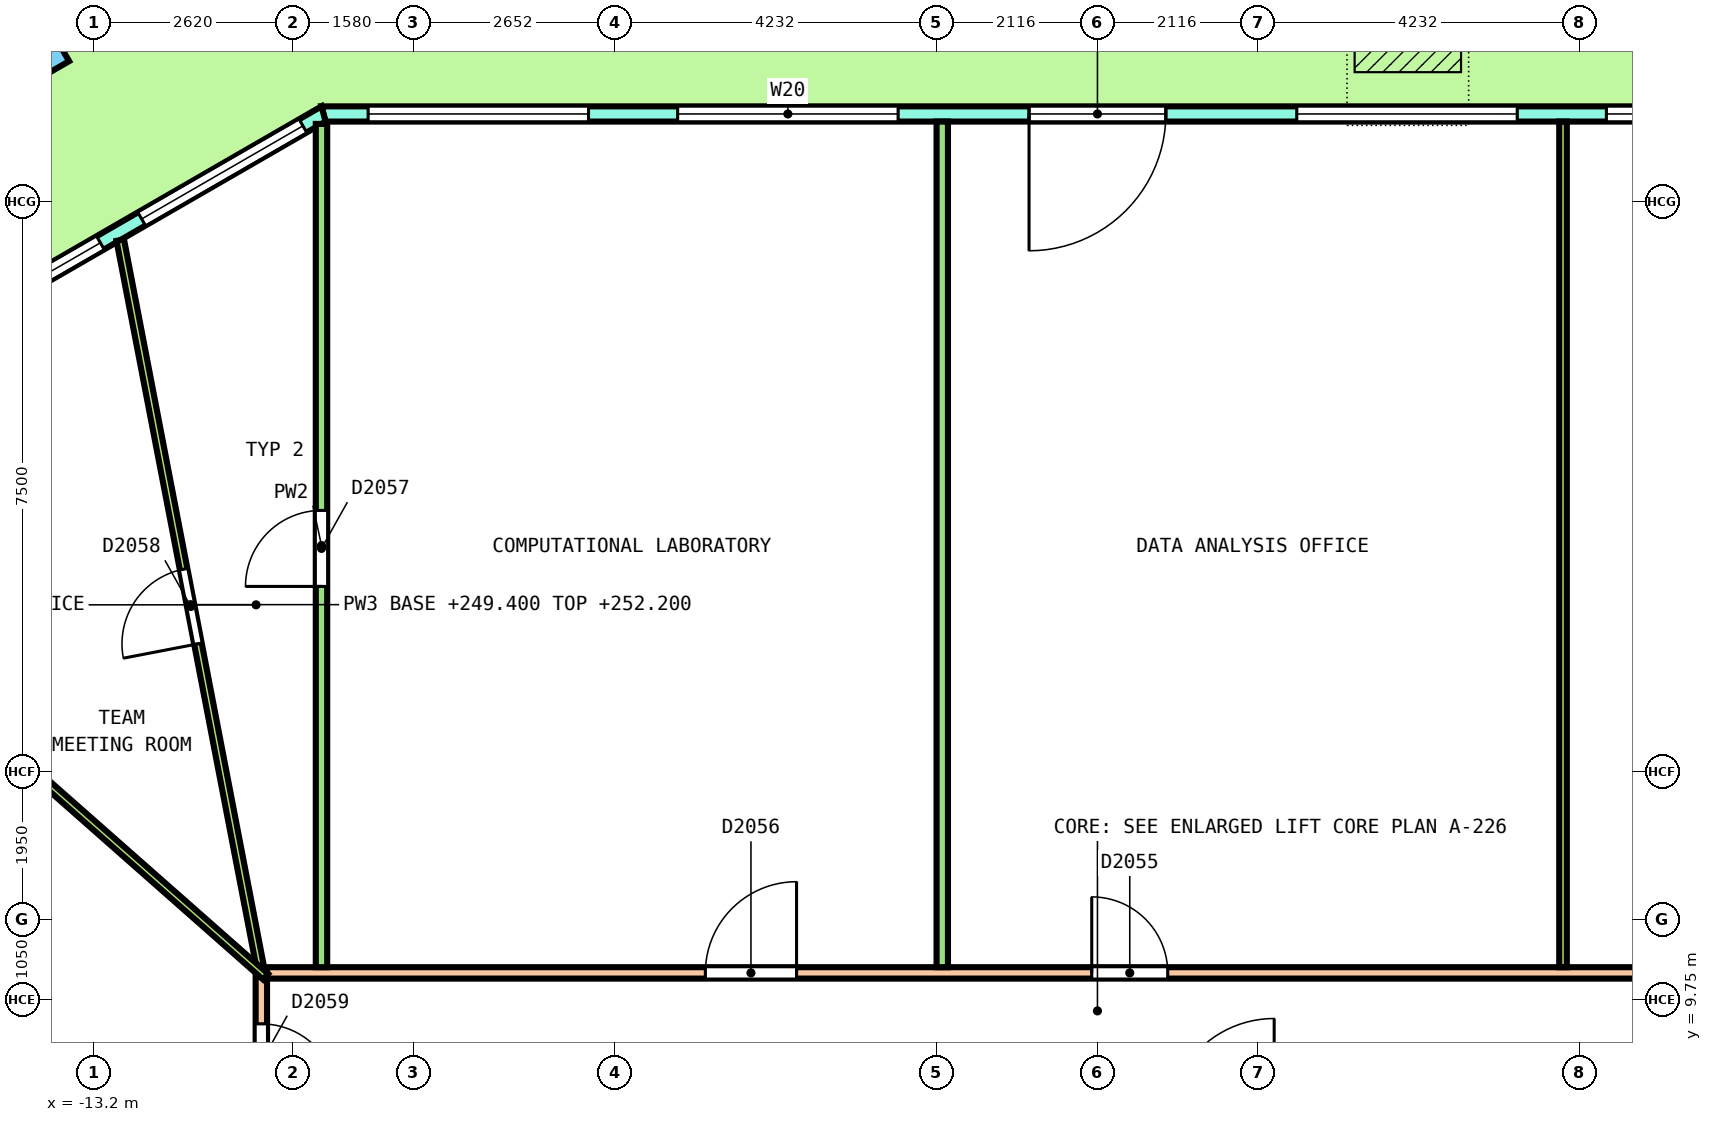
"""IFC4 building model, lengths in metres.
Left out: names, types, materials, properties, quantities, classifications, styles, units other than length and angle.
Written with IfcOpenShell. Run it as: python <this file> out.ifc"""

import sys

from ifc_helpers import new_model, si_unit, direction, frame, frame_2d, origin, origin_2d, place, context, subcontext, project, spatial, polyline, rectangle, outline, extrude, element, fill, save


model = new_model("IFC4")
c1 = context("Model", 3, precision=1e-05, world=origin(), true_north=direction((0.0, 1.0)))
c2 = subcontext(c1, "Body", "Model", "MODEL_VIEW")
j1 = project(units=[si_unit("LENGTHUNIT", "METRE"), si_unit("PLANEANGLEUNIT", "RADIAN")], contexts=[c1])
p1 = place(None, origin())
s1 = spatial("IfcSite", under=j1, at=p1, CompositionType="ELEMENT")
p2 = place(p1, origin())
s2 = spatial("IfcBuilding", under=s1, at=p2, CompositionType="ELEMENT")
p3 = place(p2, frame((0.0, 0.0, 249.4)))
s3 = spatial("IfcBuildingStorey", under=s2, at=p3, CompositionType="ELEMENT", Elevation=249.4)
p4 = place(p3, frame((-14.246, 22.287, 0.0), z_axis=(-0.036260511264, 0.0, 0.999342371424), x_axis=(-0.865313694921, -0.500246354177, -0.031397364786)))
e1 = element("IfcColumn", 1, at=p4, inside=s3, PredefinedType="COLUMN", context=c2, shape_type="SweptSolid", body=[
    extrude(rectangle(XDim=1.05, YDim=1.05, at=origin_2d()), origin(), (0.0, 0.0, 1.0), 3.643),
])
p5 = place(p3, frame((10.182, 21.4, 0.0), z_axis=(0.0, 0.0, 1.0), x_axis=(-1.0, 0.0, 0.0)))
e2 = element("IfcWall", 2, at=p5, inside=s3, PredefinedType="SOLIDWALL", context=c2, shape_type="SweptSolid", body=[
    extrude(outline(polyline([(-0.027, -0.1), (0.994, -0.1), (2.015, -0.1), (3.036, -0.1), (4.057, -0.1), (5.078, -0.1), (6.098, -0.1), (7.119, -0.1), (8.14, -0.1), (9.161, -0.1), (10.182, -0.1), (11.203, -0.1), (12.224, -0.1), (13.245, -0.1), (14.265, -0.1), (15.286, -0.1), (16.307, -0.1), (17.328, -0.1), (18.349, -0.1), (19.37, -0.1), (20.391, -0.1), (20.337, 0.1), (19.321, 0.1), (18.306, 0.1), (17.291, 0.1), (16.275, 0.1), (15.259, 0.1), (14.244, 0.1), (13.229, 0.1), (12.213, 0.1), (11.197, 0.1), (10.182, 0.1), (9.167, 0.1), (8.151, 0.1), (7.135, 0.1), (6.12, 0.1), (5.104, 0.1), (4.089, 0.1), (3.073, 0.1), (2.058, 0.1), (1.042, 0.1), (0.027, 0.1), (-0.027, -0.1)])), origin(), (0.0, 0.0, 1.0), 3.7),
])
p6 = place(p5, frame((0.586, 0.0, 0.1)))
e3 = element("IfcOpeningElement", 3, at=p6, cuts=e2, PredefinedType="OPENING", context=c2, shape_type="SweptSolid", body=[
    extrude(rectangle(XDim=2.9, YDim=2.65, at=frame_2d((1.45, 1.325))), frame((0.0, 0.11, 0.0), z_axis=(0.0, -1.0, 0.0), x_axis=(1.0, 0.0, 0.0)), (0.0, 0.0, 1.0), 0.22),
])
p7 = place(p5, frame((4.659, 0.0, 0.1)))
e4 = element("IfcOpeningElement", 4, at=p7, cuts=e2, PredefinedType="OPENING", context=c2, shape_type="SweptSolid", body=[
    extrude(rectangle(XDim=2.9, YDim=2.65, at=frame_2d((1.45, 1.325))), frame((0.0, 0.11, 0.0), z_axis=(0.0, -1.0, 0.0), x_axis=(1.0, 0.0, 0.0)), (0.0, 0.0, 1.0), 0.22),
])
p8 = place(p5, frame((9.282, 0.0, 0.0)))
e5 = element("IfcOpeningElement", 5, at=p8, cuts=e2, PredefinedType="OPENING", context=c2, shape_type="SweptSolid", body=[
    extrude(rectangle(XDim=1.8, YDim=2.4, at=frame_2d((0.9, 1.2))), frame((0.0, 0.11, 0.0), z_axis=(0.0, -1.0, 0.0), x_axis=(1.0, 0.0, 0.0)), (0.0, 0.0, 1.0), 0.22),
])
p9 = place(p5, frame((9.282, 0.0, 2.55)))
e6 = element("IfcOpeningElement", 6, at=p9, cuts=e2, PredefinedType="OPENING", context=c2, shape_type="SweptSolid", body=[
    extrude(rectangle(XDim=1.8, YDim=0.2, at=frame_2d((0.9, 0.1))), frame((0.0, 0.11, 0.0), z_axis=(0.0, -1.0, 0.0), x_axis=(1.0, 0.0, 0.0)), (0.0, 0.0, 1.0), 0.22),
])
p10 = place(p5, frame((12.805, 0.0, 0.1)))
e7 = element("IfcOpeningElement", 7, at=p10, cuts=e2, PredefinedType="OPENING", context=c2, shape_type="SweptSolid", body=[
    extrude(rectangle(XDim=2.9, YDim=2.65, at=frame_2d((1.45, 1.325))), frame((0.0, 0.11, 0.0), z_axis=(0.0, -1.0, 0.0), x_axis=(1.0, 0.0, 0.0)), (0.0, 0.0, 1.0), 0.22),
])
p11 = place(p5, frame((16.877, 0.0, 0.1)))
e8 = element("IfcOpeningElement", 8, at=p11, cuts=e2, PredefinedType="OPENING", context=c2, shape_type="SweptSolid", body=[
    extrude(rectangle(XDim=2.9, YDim=2.65, at=frame_2d((1.45, 1.325))), frame((0.0, 0.11, 0.0), z_axis=(0.0, -1.0, 0.0), x_axis=(1.0, 0.0, 0.0)), (0.0, 0.0, 1.0), 0.22),
])
p12 = place(p3, frame((-10.182, 21.4, 0.0), z_axis=(0.0, 0.0, 1.0), x_axis=(-0.866029647142, -0.499992650217, 0.0)))
e9 = element("IfcWall", 9, at=p12, inside=s3, PredefinedType="SOLIDWALL", context=c2, shape_type="SweptSolid", body=[
    extrude(outline(polyline([(-0.027, -0.1), (1.008, -0.1), (2.042, -0.1), (3.076, -0.1), (4.111, -0.1), (5.145, -0.1), (6.18, -0.1), (6.126, 0.1), (5.109, 0.1), (4.093, 0.1), (3.076, 0.1), (2.06, 0.1), (1.043, 0.1), (0.027, 0.1), (-0.027, -0.1)])), origin(), (0.0, 0.0, 1.0), 3.7),
])
p13 = place(p12, frame((0.313, 0.0, 0.1)))
e10 = element("IfcOpeningElement", 10, at=p13, cuts=e9, PredefinedType="OPENING", context=c2, shape_type="SweptSolid", body=[
    extrude(rectangle(XDim=2.45, YDim=2.65, at=frame_2d((1.225, 1.325))), frame((0.0, 0.11, 0.0), z_axis=(0.0, -1.0, 0.0), x_axis=(1.0, 0.0, 0.0)), (0.0, 0.0, 1.0), 0.22),
])
p14 = place(p12, frame((3.39, 0.0, 0.1)))
e11 = element("IfcOpeningElement", 11, at=p14, cuts=e9, PredefinedType="OPENING", context=c2, shape_type="SweptSolid", body=[
    extrude(rectangle(XDim=2.45, YDim=2.65, at=frame_2d((1.225, 1.325))), frame((0.0, 0.11, 0.0), z_axis=(0.0, -1.0, 0.0), x_axis=(1.0, 0.0, 0.0)), (0.0, 0.0, 1.0), 0.22),
])
p15 = place(p3, frame((-10.925, 10.1, 0.0), z_axis=(0.0, 0.0, 1.0), x_axis=(1.0, 0.0, 0.0)))
e12 = element("IfcWall", 12, at=p15, inside=s3, PredefinedType="PARTITIONING", context=c2, shape_type="SweptSolid", body=[
    extrude(rectangle(XDim=21.875, YDim=0.15, at=frame_2d((10.938, 0.0))), origin(), (0.0, 0.0, 1.0), 2.8),
])
p16 = place(p15, frame((18.511, 0.0, 0.0)))
e13 = element("IfcOpeningElement", 13, at=p16, cuts=e12, PredefinedType="OPENING", context=c2, shape_type="SweptSolid", body=[
    extrude(rectangle(XDim=1.0, YDim=2.1, at=frame_2d((0.5, 1.05))), frame((0.0, 0.085, 0.0), z_axis=(0.0, -1.0, 0.0), x_axis=(1.0, 0.0, 0.0)), (0.0, 0.0, 1.0), 0.17),
])
p17 = place(p15, frame((10.85, 0.0, 0.0)))
e14 = element("IfcOpeningElement", 14, at=p17, cuts=e12, PredefinedType="OPENING", context=c2, shape_type="SweptSolid", body=[
    extrude(rectangle(XDim=1.0, YDim=2.1, at=frame_2d((0.5, 1.05))), frame((0.0, 0.085, 0.0), z_axis=(0.0, -1.0, 0.0), x_axis=(1.0, 0.0, 0.0)), (0.0, 0.0, 1.0), 0.17),
])
p18 = place(p15, frame((5.767, 0.0, 0.0)))
e15 = element("IfcOpeningElement", 15, at=p18, cuts=e12, PredefinedType="OPENING", context=c2, shape_type="SweptSolid", body=[
    extrude(rectangle(XDim=1.2, YDim=2.1, at=frame_2d((0.6, 1.05))), frame((0.0, 0.085, 0.0), z_axis=(0.0, -1.0, 0.0), x_axis=(1.0, 0.0, 0.0)), (0.0, 0.0, 1.0), 0.17),
])
p19 = place(p3, frame((-11.0, -7.225, 0.0), z_axis=(0.0, 0.0, 1.0), x_axis=(0.0, 1.0, 0.0)))
e16 = element("IfcWall", 16, at=p19, inside=s3, PredefinedType="PARTITIONING", context=c2, shape_type="SweptSolid", body=[
    extrude(rectangle(XDim=17.275, YDim=0.15, at=frame_2d((8.638, 0.0))), origin(), (0.0, 0.0, 1.0), 2.8),
])
p20 = place(p19, frame((15.654, 0.0, 0.0)))
e17 = element("IfcOpeningElement", 17, at=p20, cuts=e16, PredefinedType="OPENING", context=c2, shape_type="SweptSolid", body=[
    extrude(rectangle(XDim=1.0, YDim=2.1, at=frame_2d((0.5, 1.05))), frame((0.0, 0.085, 0.0), z_axis=(0.0, -1.0, 0.0), x_axis=(1.0, 0.0, 0.0)), (0.0, 0.0, 1.0), 0.17),
])
p21 = place(p19, frame((12.264, 0.0, 0.0)))
e18 = element("IfcOpeningElement", 18, at=p21, cuts=e16, PredefinedType="OPENING", context=c2, shape_type="SweptSolid", body=[
    extrude(rectangle(XDim=1.0, YDim=2.1, at=frame_2d((0.5, 1.05))), frame((0.0, 0.085, 0.0), z_axis=(0.0, -1.0, 0.0), x_axis=(1.0, 0.0, 0.0)), (0.0, 0.0, 1.0), 0.17),
])
p22 = place(p19, frame((9.822, 0.0, 0.0)))
e19 = element("IfcOpeningElement", 19, at=p22, cuts=e16, PredefinedType="OPENING", context=c2, shape_type="SweptSolid", body=[
    extrude(rectangle(XDim=1.0, YDim=2.1, at=frame_2d((0.5, 1.05))), frame((0.0, 0.085, 0.0), z_axis=(0.0, -1.0, 0.0), x_axis=(1.0, 0.0, 0.0)), (0.0, 0.0, 1.0), 0.17),
])
p23 = place(p19, frame((6.157, 0.0, 0.0)))
e20 = element("IfcOpeningElement", 20, at=p23, cuts=e16, PredefinedType="OPENING", context=c2, shape_type="SweptSolid", body=[
    extrude(rectangle(XDim=1.0, YDim=2.1, at=frame_2d((0.5, 1.05))), frame((0.0, 0.085, 0.0), z_axis=(0.0, -1.0, 0.0), x_axis=(1.0, 0.0, 0.0)), (0.0, 0.0, 1.0), 0.17),
])
p24 = place(p3, frame((-2.042, 10.175, 0.0), z_axis=(0.0, 0.0, 1.0), x_axis=(0.0, 1.0, 0.0)))
e21 = element("IfcWall", 21, at=p24, inside=s3, PredefinedType="PARTITIONING", context=c2, shape_type="SweptSolid", body=[
    extrude(rectangle(XDim=11.125, YDim=0.15, at=frame_2d((5.562, 0.0))), origin(), (0.0, 0.0, 1.0), 2.8),
])
p25 = place(p3, frame((-10.208, 10.175, 0.0), z_axis=(0.0, 0.0, 1.0), x_axis=(0.0, 1.0, 0.0)))
e22 = element("IfcWall", 22, at=p25, inside=s3, PredefinedType="PARTITIONING", context=c2, shape_type="SweptSolid", body=[
    extrude(rectangle(XDim=11.094, YDim=0.15, at=frame_2d((5.547, 0.0))), origin(), (0.0, 0.0, 1.0), 2.8),
])
p26 = place(p25, frame((5.01, 0.0, 0.0)))
e23 = element("IfcOpeningElement", 23, at=p26, cuts=e22, PredefinedType="OPENING", context=c2, shape_type="SweptSolid", body=[
    extrude(rectangle(XDim=1.0, YDim=2.1, at=frame_2d((0.5, 1.05))), frame((0.0, 0.085, 0.0), z_axis=(0.0, -1.0, 0.0), x_axis=(1.0, 0.0, 0.0)), (0.0, 0.0, 1.0), 0.17),
])
p27 = place(p3, frame((6.125, 10.175, 0.0), z_axis=(0.0, 0.0, 1.0), x_axis=(0.0, 1.0, 0.0)))
e24 = element("IfcWall", 24, at=p27, inside=s3, PredefinedType="PARTITIONING", context=c2, shape_type="SweptSolid", body=[
    extrude(rectangle(XDim=11.125, YDim=0.1, at=frame_2d((5.562, 0.0))), origin(), (0.0, 0.0, 1.0), 2.8),
])
p28 = place(p3, frame((-12.856, 19.74, 0.0), z_axis=(0.0, 0.0, 1.0), x_axis=(0.189064323856, -0.981964704786, 0.0)))
e25 = element("IfcWall", 25, at=p28, inside=s3, PredefinedType="PARTITIONING", context=c2, shape_type="SweptSolid", body=[
    extrude(rectangle(XDim=9.768, YDim=0.1, at=frame_2d((4.884, 0.0))), origin(), (0.0, 0.0, 1.0), 2.8),
])
p29 = place(p28, frame((4.409, 0.0, 0.0)))
e26 = element("IfcOpeningElement", 26, at=p29, cuts=e25, PredefinedType="OPENING", context=c2, shape_type="SweptSolid", body=[
    extrude(rectangle(XDim=1.0, YDim=2.1, at=frame_2d((0.5, 1.05))), frame((0.0, 0.06, 0.0), z_axis=(0.0, -1.0, 0.0), x_axis=(1.0, 0.0, 0.0)), (0.0, 0.0, 1.0), 0.12),
])
p30 = place(p3, frame((-17.059, 15.442, 0.0), z_axis=(0.0, 0.0, 1.0), x_axis=(0.75007988562, -0.661347234959, 0.0)))
e27 = element("IfcWall", 27, at=p30, inside=s3, PredefinedType="PARTITIONING", context=c2, shape_type="SweptSolid", body=[
    extrude(rectangle(XDim=8.152, YDim=0.1, at=frame_2d((4.076, 0.0))), origin(), (0.0, 0.0, 1.0), 2.8),
])
p31 = place(p6, origin())
e28 = element("IfcWindow", 28, at=p31, inside=s3, PartitioningType="SINGLE_PANEL", PredefinedType="WINDOW", context=c2, shape_type="SweptSolid", body=[
    extrude(rectangle(XDim=2.9, YDim=2.65, at=frame_2d((1.45, 1.325))), frame((0.0, 0.03, 0.0), z_axis=(0.0, -1.0, 0.0), x_axis=(1.0, 0.0, 0.0)), (0.0, 0.0, 1.0), 0.06),
])
fill(e3, e28)
p32 = place(p7, origin())
e29 = element("IfcWindow", 29, at=p32, inside=s3, PartitioningType="SINGLE_PANEL", PredefinedType="WINDOW", context=c2, shape_type="SweptSolid", body=[
    extrude(rectangle(XDim=2.9, YDim=2.65, at=frame_2d((1.45, 1.325))), frame((0.0, 0.03, 0.0), z_axis=(0.0, -1.0, 0.0), x_axis=(1.0, 0.0, 0.0)), (0.0, 0.0, 1.0), 0.06),
])
fill(e4, e29)
p33 = place(p8, origin())
e30 = element("IfcDoor", 30, at=p33, inside=s3, OperationType="DOUBLE_DOOR_SINGLE_SWING", PredefinedType="DOOR", context=c2, shape_type="SweptSolid", body=[
    extrude(rectangle(XDim=1.8, YDim=2.4, at=frame_2d((0.9, 1.2))), frame((0.0, 0.025, 0.0), z_axis=(0.0, -1.0, 0.0), x_axis=(1.0, 0.0, 0.0)), (0.0, 0.0, 1.0), 0.05),
])
fill(e5, e30)
p34 = place(p9, origin())
e31 = element("IfcWindow", 31, at=p34, inside=s3, PartitioningType="SINGLE_PANEL", PredefinedType="WINDOW", context=c2, shape_type="SweptSolid", body=[
    extrude(rectangle(XDim=1.8, YDim=0.2, at=frame_2d((0.9, 0.1))), frame((0.0, 0.03, 0.0), z_axis=(0.0, -1.0, 0.0), x_axis=(1.0, 0.0, 0.0)), (0.0, 0.0, 1.0), 0.06),
])
fill(e6, e31)
p35 = place(p10, origin())
e32 = element("IfcWindow", 32, at=p35, inside=s3, PartitioningType="SINGLE_PANEL", PredefinedType="WINDOW", context=c2, shape_type="SweptSolid", body=[
    extrude(rectangle(XDim=2.9, YDim=2.65, at=frame_2d((1.45, 1.325))), frame((0.0, 0.03, 0.0), z_axis=(0.0, -1.0, 0.0), x_axis=(1.0, 0.0, 0.0)), (0.0, 0.0, 1.0), 0.06),
])
fill(e7, e32)
p36 = place(p11, origin())
e33 = element("IfcWindow", 33, at=p36, inside=s3, PartitioningType="SINGLE_PANEL", PredefinedType="WINDOW", context=c2, shape_type="SweptSolid", body=[
    extrude(rectangle(XDim=2.9, YDim=2.65, at=frame_2d((1.45, 1.325))), frame((0.0, 0.03, 0.0), z_axis=(0.0, -1.0, 0.0), x_axis=(1.0, 0.0, 0.0)), (0.0, 0.0, 1.0), 0.06),
])
fill(e8, e33)
p37 = place(p13, origin())
e34 = element("IfcWindow", 34, at=p37, inside=s3, PartitioningType="SINGLE_PANEL", PredefinedType="WINDOW", context=c2, shape_type="SweptSolid", body=[
    extrude(rectangle(XDim=2.45, YDim=2.65, at=frame_2d((1.225, 1.325))), frame((0.0, 0.03, 0.0), z_axis=(0.0, -1.0, 0.0), x_axis=(1.0, 0.0, 0.0)), (0.0, 0.0, 1.0), 0.06),
])
fill(e10, e34)
p38 = place(p14, origin())
e35 = element("IfcWindow", 35, at=p38, inside=s3, PartitioningType="SINGLE_PANEL", PredefinedType="WINDOW", context=c2, shape_type="SweptSolid", body=[
    extrude(rectangle(XDim=2.45, YDim=2.65, at=frame_2d((1.225, 1.325))), frame((0.0, 0.03, 0.0), z_axis=(0.0, -1.0, 0.0), x_axis=(1.0, 0.0, 0.0)), (0.0, 0.0, 1.0), 0.06),
])
fill(e11, e35)
p39 = place(p17, origin())
e36 = element("IfcDoor", 36, at=p39, inside=s3, OperationType="SINGLE_SWING_LEFT", PredefinedType="DOOR", context=c2, shape_type="SweptSolid", body=[
    extrude(rectangle(XDim=1.0, YDim=2.1, at=frame_2d((0.5, 1.05))), frame((0.0, 0.025, 0.0), z_axis=(0.0, -1.0, 0.0), x_axis=(1.0, 0.0, 0.0)), (0.0, 0.0, 1.0), 0.05),
])
fill(e14, e36)
p40 = place(p18, origin())
e37 = element("IfcDoor", 37, at=p40, inside=s3, OperationType="DOUBLE_DOOR_SINGLE_SWING", PredefinedType="DOOR", context=c2, shape_type="SweptSolid", body=[
    extrude(rectangle(XDim=1.2, YDim=2.1, at=frame_2d((0.6, 1.05))), frame((0.0, 0.025, 0.0), z_axis=(0.0, -1.0, 0.0), x_axis=(1.0, 0.0, 0.0)), (0.0, 0.0, 1.0), 0.05),
])
fill(e15, e37)
p41 = place(p26, origin())
e38 = element("IfcDoor", 38, at=p41, inside=s3, OperationType="SINGLE_SWING_LEFT", PredefinedType="DOOR", context=c2, shape_type="SweptSolid", body=[
    extrude(rectangle(XDim=1.0, YDim=2.1, at=frame_2d((0.5, 1.05))), frame((0.0, 0.025, 0.0), z_axis=(0.0, -1.0, 0.0), x_axis=(1.0, 0.0, 0.0)), (0.0, 0.0, 1.0), 0.05),
])
fill(e23, e38)
p42 = place(p29, origin())
e39 = element("IfcDoor", 39, at=p42, inside=s3, OperationType="SINGLE_SWING_RIGHT", PredefinedType="DOOR", context=c2, shape_type="SweptSolid", body=[
    extrude(rectangle(XDim=1.0, YDim=2.1, at=frame_2d((0.5, 1.05))), frame((0.0, 0.025, 0.0), z_axis=(0.0, -1.0, 0.0), x_axis=(1.0, 0.0, 0.0)), (0.0, 0.0, 1.0), 0.05),
])
fill(e26, e39)
p43 = place(p20, origin())
e40 = element("IfcDoor", 40, at=p43, inside=s3, OperationType="SINGLE_SWING_RIGHT", PredefinedType="DOOR", context=c2, shape_type="SweptSolid", body=[
    extrude(rectangle(XDim=1.0, YDim=2.1, at=frame_2d((0.5, 1.05))), frame((0.0, 0.025, 0.0), z_axis=(0.0, -1.0, 0.0), x_axis=(1.0, 0.0, 0.0)), (0.0, 0.0, 1.0), 0.05),
])
fill(e17, e40)
save(model, sys.argv[1])
